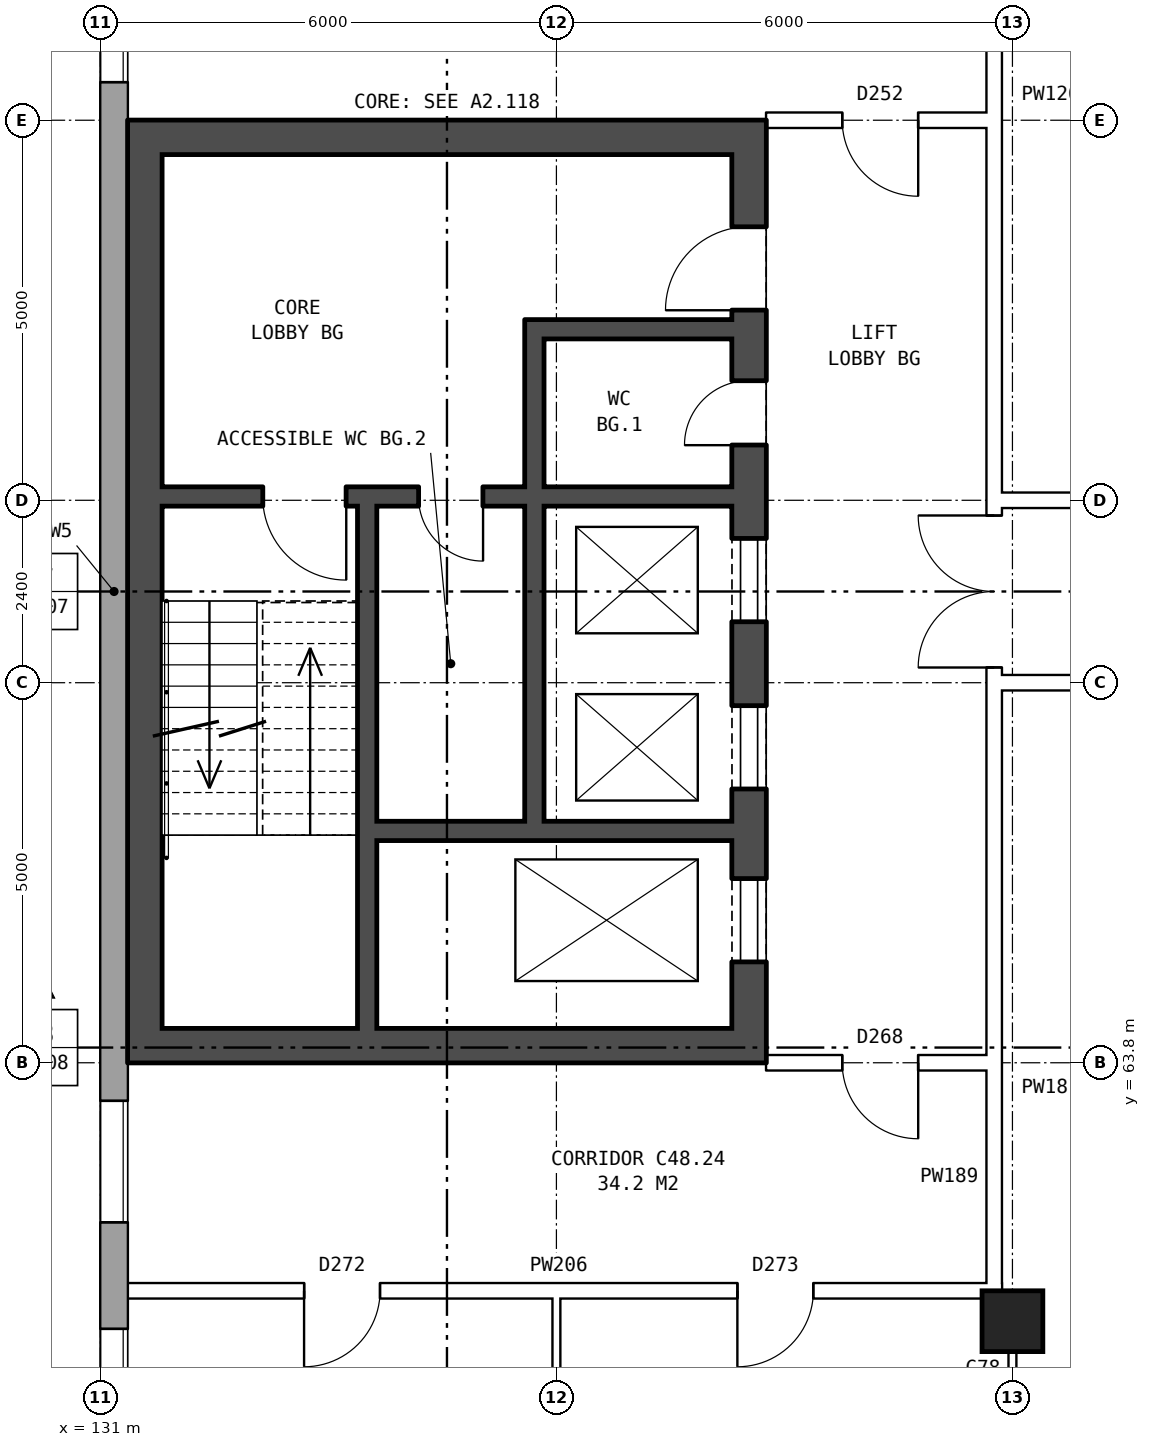
"""IFC4 building model, lengths in metres.
Left out: names, types, materials, properties, quantities, classifications, styles, units other than length and angle.
Written with IfcOpenShell. Run it as: python <this file> out.ifc"""

import sys

from ifc_helpers import new_model, si_unit, direction, frame, frame_2d, origin, origin_2d, place, context, subcontext, project, spatial, rectangle, extrude, element, fill, save


model = new_model("IFC4")
c1 = context("Model", 3, precision=1e-05, world=origin(), true_north=direction((0.0, 1.0)))
c2 = subcontext(c1, "Body", "Model", "MODEL_VIEW")
j1 = project(units=[si_unit("LENGTHUNIT", "METRE"), si_unit("PLANEANGLEUNIT", "RADIAN")], contexts=[c1])
p1 = place(None, origin())
s1 = spatial("IfcSite", under=j1, at=p1, CompositionType="ELEMENT")
p2 = place(p1, origin())
s2 = spatial("IfcBuilding", under=s1, at=p2, CompositionType="ELEMENT")
p3 = place(p2, frame((0.0, 0.0, 171.6)))
s3 = spatial("IfcBuildingStorey", under=s2, at=p3, CompositionType="ELEMENT", Elevation=171.6)
p4 = place(p3, frame((143.0, 60.4, 0.0), z_axis=(0.0, 0.0, 1.0), x_axis=(1.0, 0.0, 0.0)))
e1 = element("IfcColumn", 1, at=p4, inside=s3, PredefinedType="COLUMN", context=c2, shape_type="SweptSolid", body=[
    extrude(rectangle(XDim=0.8, YDim=0.8, at=origin_2d()), origin(), (0.0, 0.0, 1.0), 3.6),
])
p5 = place(p3, frame((131.18, 82.925, 0.0), z_axis=(0.0, 0.0, 1.0), x_axis=(0.0, -1.0, 0.0)))
e2 = element("IfcWall", 2, at=p5, inside=s3, PredefinedType="STANDARD", context=c2, shape_type="SweptSolid", body=[
    extrude(rectangle(XDim=25.851, YDim=0.36, at=frame_2d((12.925, 0.0))), origin(), (0.0, 0.0, 1.0), 3.6),
])
p6 = place(p5, frame((1.625, 0.0, 0.8)))
e3 = element("IfcOpeningElement", 3, at=p6, cuts=e2, PredefinedType="OPENING", context=c2, shape_type="SweptSolid", body=[
    extrude(rectangle(XDim=1.6, YDim=1.8, at=frame_2d((0.8, 0.9))), frame((0.0, 0.19, 0.0), z_axis=(0.0, -1.0, 0.0), x_axis=(1.0, 0.0, 0.0)), (0.0, 0.0, 1.0), 0.38),
])
p7 = place(p5, frame((4.625, 0.0, 0.8)))
e4 = element("IfcOpeningElement", 4, at=p7, cuts=e2, PredefinedType="OPENING", context=c2, shape_type="SweptSolid", body=[
    extrude(rectangle(XDim=1.6, YDim=1.8, at=frame_2d((0.8, 0.9))), frame((0.0, 0.19, 0.0), z_axis=(0.0, -1.0, 0.0), x_axis=(1.0, 0.0, 0.0)), (0.0, 0.0, 1.0), 0.38),
])
p8 = place(p5, frame((19.625, 0.0, 0.8)))
e5 = element("IfcOpeningElement", 5, at=p8, cuts=e2, PredefinedType="OPENING", context=c2, shape_type="SweptSolid", body=[
    extrude(rectangle(XDim=1.6, YDim=1.8, at=frame_2d((0.8, 0.9))), frame((0.0, 0.19, 0.0), z_axis=(0.0, -1.0, 0.0), x_axis=(1.0, 0.0, 0.0)), (0.0, 0.0, 1.0), 0.38),
])
p9 = place(p5, frame((22.625, 0.0, 0.8)))
e6 = element("IfcOpeningElement", 6, at=p9, cuts=e2, PredefinedType="OPENING", context=c2, shape_type="SweptSolid", body=[
    extrude(rectangle(XDim=1.6, YDim=1.8, at=frame_2d((0.8, 0.9))), frame((0.0, 0.19, 0.0), z_axis=(0.0, -1.0, 0.0), x_axis=(1.0, 0.0, 0.0)), (0.0, 0.0, 1.0), 0.38),
])
p10 = place(p3, frame((139.535, 63.8, 0.0), z_axis=(0.0, 0.0, 1.0), x_axis=(0.0, 1.0, 0.0)))
e7 = element("IfcWall", 7, at=p10, inside=s3, PredefinedType="SHEAR", context=c2, shape_type="SweptSolid", body=[
    extrude(rectangle(XDim=12.4, YDim=0.45, at=frame_2d((6.2, 0.0))), origin(), (0.0, 0.0, 1.0), 3.6),
])
p11 = place(p10, frame((1.325, 0.0, 0.0)))
e8 = element("IfcOpeningElement", 8, at=p11, cuts=e7, PredefinedType="OPENING", context=c2, shape_type="SweptSolid", body=[
    extrude(rectangle(XDim=1.1, YDim=2.1, at=frame_2d((0.55, 1.05))), frame((0.0, 0.235, 0.0), z_axis=(0.0, -1.0, 0.0), x_axis=(1.0, 0.0, 0.0)), (0.0, 0.0, 1.0), 0.47),
])
p12 = place(p10, frame((3.6, 0.0, 0.0)))
e9 = element("IfcOpeningElement", 9, at=p12, cuts=e7, PredefinedType="OPENING", context=c2, shape_type="SweptSolid", body=[
    extrude(rectangle(XDim=1.1, YDim=2.1, at=frame_2d((0.55, 1.05))), frame((0.0, 0.235, 0.0), z_axis=(0.0, -1.0, 0.0), x_axis=(1.0, 0.0, 0.0)), (0.0, 0.0, 1.0), 0.47),
])
p13 = place(p10, frame((5.8, 0.0, 0.0)))
e10 = element("IfcOpeningElement", 10, at=p13, cuts=e7, PredefinedType="OPENING", context=c2, shape_type="SweptSolid", body=[
    extrude(rectangle(XDim=1.1, YDim=2.1, at=frame_2d((0.55, 1.05))), frame((0.0, 0.235, 0.0), z_axis=(0.0, -1.0, 0.0), x_axis=(1.0, 0.0, 0.0)), (0.0, 0.0, 1.0), 0.47),
])
p14 = place(p10, frame((9.9, 0.0, 0.0)))
e11 = element("IfcOpeningElement", 11, at=p14, cuts=e7, PredefinedType="OPENING", context=c2, shape_type="SweptSolid", body=[
    extrude(rectangle(XDim=1.1, YDim=2.1, at=frame_2d((0.55, 1.05))), frame((0.0, 0.235, 0.0), z_axis=(0.0, -1.0, 0.0), x_axis=(1.0, 0.0, 0.0)), (0.0, 0.0, 1.0), 0.47),
])
p15 = place(p10, frame((8.125, 0.0, 0.0)))
e12 = element("IfcOpeningElement", 12, at=p15, cuts=e7, PredefinedType="OPENING", context=c2, shape_type="SweptSolid", body=[
    extrude(rectangle(XDim=0.85, YDim=2.1, at=frame_2d((0.425, 1.05))), frame((0.0, 0.235, 0.0), z_axis=(0.0, -1.0, 0.0), x_axis=(1.0, 0.0, 0.0)), (0.0, 0.0, 1.0), 0.47),
])
p16 = place(p3, frame((131.585, 63.8, 0.0), z_axis=(0.0, 0.0, 1.0), x_axis=(0.0, 1.0, 0.0)))
e13 = element("IfcWall", 13, at=p16, inside=s3, PredefinedType="SHEAR", context=c2, shape_type="SweptSolid", body=[
    extrude(rectangle(XDim=12.4, YDim=0.45, at=frame_2d((6.2, 0.0))), origin(), (0.0, 0.0, 1.0), 3.6),
])
for number, where, z_axis, x_axis in (
    (14, (139.31, 64.025, 0.0), (0.0, 0.0, 1.0), (-1.0, 0.0, 0.0)),
    (15, (139.31, 75.975, 0.0), (0.0, 0.0, 1.0), (-1.0, 0.0, 0.0)),
):
    element("IfcWall", number, at=place(p3, frame(where, z_axis=z_axis, x_axis=x_axis)), inside=s3, PredefinedType="SHEAR", context=c2, shape_type="SweptSolid", body=[
        extrude(rectangle(XDim=7.5, YDim=0.45, at=frame_2d((3.75, 0.0))), origin(), (0.0, 0.0, 1.0), 3.6),
    ])
p17 = place(p3, frame((139.31, 66.85, 0.0), z_axis=(0.0, 0.0, 1.0), x_axis=(-1.0, 0.0, 0.0)))
e16 = element("IfcWall", 16, at=p17, inside=s3, PredefinedType="SHEAR", context=c2, shape_type="SweptSolid", body=[
    extrude(rectangle(XDim=4.675, YDim=0.25, at=frame_2d((2.337, 0.0))), origin(), (0.0, 0.0, 1.0), 3.6),
])
p18 = place(p3, frame((139.31, 71.25, 0.0), z_axis=(0.0, 0.0, 1.0), x_axis=(-1.0, 0.0, 0.0)))
e17 = element("IfcWall", 17, at=p18, inside=s3, PredefinedType="SHEAR", context=c2, shape_type="SweptSolid", body=[
    extrude(rectangle(XDim=7.5, YDim=0.25, at=frame_2d((3.75, 0.0))), origin(), (0.0, 0.0, 1.0), 3.6),
])
p19 = place(p18, frame((5.075, 0.0, 0.0)))
e18 = element("IfcOpeningElement", 18, at=p19, cuts=e17, PredefinedType="OPENING", context=c2, shape_type="SweptSolid", body=[
    extrude(rectangle(XDim=1.1, YDim=2.1, at=frame_2d((0.55, 1.05))), frame((0.0, 0.135, 0.0), z_axis=(0.0, -1.0, 0.0), x_axis=(1.0, 0.0, 0.0)), (0.0, 0.0, 1.0), 0.27),
])
p20 = place(p18, frame((3.275, 0.0, 0.0)))
e19 = element("IfcOpeningElement", 19, at=p20, cuts=e17, PredefinedType="OPENING", context=c2, shape_type="SweptSolid", body=[
    extrude(rectangle(XDim=0.85, YDim=2.1, at=frame_2d((0.425, 1.05))), frame((0.0, 0.135, 0.0), z_axis=(0.0, -1.0, 0.0), x_axis=(1.0, 0.0, 0.0)), (0.0, 0.0, 1.0), 0.27),
])
p21 = place(p3, frame((139.31, 73.45, 0.0), z_axis=(0.0, 0.0, 1.0), x_axis=(-1.0, 0.0, 0.0)))
e20 = element("IfcWall", 20, at=p21, inside=s3, PredefinedType="SHEAR", context=c2, shape_type="SweptSolid", body=[
    extrude(rectangle(XDim=2.475, YDim=0.25, at=frame_2d((1.238, 0.0))), origin(), (0.0, 0.0, 1.0), 3.6),
])
p22 = place(p3, frame((136.71, 66.975, 0.0), z_axis=(0.0, 0.0, 1.0), x_axis=(0.0, 1.0, 0.0)))
e21 = element("IfcWall", 21, at=p22, inside=s3, PredefinedType="SHEAR", context=c2, shape_type="SweptSolid", body=[
    extrude(rectangle(XDim=4.15, YDim=0.25, at=frame_2d((2.075, 0.0))), origin(), (0.0, 0.0, 1.0), 3.6),
])
p23 = place(p3, frame((136.71, 71.375, 0.0), z_axis=(0.0, 0.0, 1.0), x_axis=(0.0, 1.0, 0.0)))
e22 = element("IfcWall", 22, at=p23, inside=s3, PredefinedType="SHEAR", context=c2, shape_type="SweptSolid", body=[
    extrude(rectangle(XDim=2.2, YDim=0.25, at=frame_2d((1.1, 0.0))), origin(), (0.0, 0.0, 1.0), 3.6),
])
p24 = place(p3, frame((134.51, 64.25, 0.0), z_axis=(0.0, 0.0, 1.0), x_axis=(0.0, 1.0, 0.0)))
e23 = element("IfcWall", 23, at=p24, inside=s3, PredefinedType="SHEAR", context=c2, shape_type="SweptSolid", body=[
    extrude(rectangle(XDim=6.875, YDim=0.25, at=frame_2d((3.438, 0.0))), origin(), (0.0, 0.0, 1.0), 3.6),
])
p25 = place(p3, frame((142.76, 63.9, 0.0), z_axis=(0.0, 0.0, 1.0), x_axis=(0.0, 1.0, 0.0)))
e24 = element("IfcWall", 24, at=p25, inside=s3, PredefinedType="PARTITIONING", context=c2, shape_type="SweptSolid", body=[
    extrude(rectangle(XDim=12.2, YDim=0.2, at=frame_2d((6.1, 0.0))), origin(), (0.0, 0.0, 1.0), 3.6),
])
p26 = place(p25, frame((5.1, 0.0, 0.0)))
e25 = element("IfcOpeningElement", 25, at=p26, cuts=e24, PredefinedType="OPENING", context=c2, shape_type="SweptSolid", body=[
    extrude(rectangle(XDim=2.0, YDim=2.1, at=frame_2d((1.0, 1.05))), frame((0.0, 0.11, 0.0), z_axis=(0.0, -1.0, 0.0), x_axis=(1.0, 0.0, 0.0)), (0.0, 0.0, 1.0), 0.22),
])
p27 = place(p3, frame((131.24, 60.8, 0.0), z_axis=(0.0, 0.0, 1.0), x_axis=(1.0, 0.0, 0.0)))
e26 = element("IfcWall", 26, at=p27, inside=s3, PredefinedType="PARTITIONING", context=c2, shape_type="SweptSolid", body=[
    extrude(rectangle(XDim=11.622, YDim=0.2, at=frame_2d((5.811, 0.0))), origin(), (0.0, 0.0, 1.0), 3.6),
])
p28 = place(p27, frame((2.44, 0.0, 0.0)))
e27 = element("IfcOpeningElement", 27, at=p28, cuts=e26, PredefinedType="OPENING", context=c2, shape_type="SweptSolid", body=[
    extrude(rectangle(XDim=1.0, YDim=2.1, at=frame_2d((0.5, 1.05))), frame((0.0, 0.11, 0.0), z_axis=(0.0, -1.0, 0.0), x_axis=(1.0, 0.0, 0.0)), (0.0, 0.0, 1.0), 0.22),
])
p29 = place(p27, frame((8.141, 0.0, 0.0)))
e28 = element("IfcOpeningElement", 28, at=p29, cuts=e26, PredefinedType="OPENING", context=c2, shape_type="SweptSolid", body=[
    extrude(rectangle(XDim=1.0, YDim=2.1, at=frame_2d((0.5, 1.05))), frame((0.0, 0.11, 0.0), z_axis=(0.0, -1.0, 0.0), x_axis=(1.0, 0.0, 0.0)), (0.0, 0.0, 1.0), 0.22),
])
p30 = place(p3, frame((139.76, 63.8, 0.0), z_axis=(0.0, 0.0, 1.0), x_axis=(1.0, 0.0, 0.0)))
e29 = element("IfcWall", 29, at=p30, inside=s3, PredefinedType="PARTITIONING", context=c2, shape_type="SweptSolid", body=[
    extrude(rectangle(XDim=3.1, YDim=0.2, at=frame_2d((1.55, 0.0))), origin(), (0.0, 0.0, 1.0), 3.6),
])
p31 = place(p30, frame((1.0, 0.0, 0.0)))
e30 = element("IfcOpeningElement", 30, at=p31, cuts=e29, PredefinedType="OPENING", context=c2, shape_type="SweptSolid", body=[
    extrude(rectangle(XDim=1.0, YDim=2.1, at=frame_2d((0.5, 1.05))), frame((0.0, 0.11, 0.0), z_axis=(0.0, -1.0, 0.0), x_axis=(1.0, 0.0, 0.0)), (0.0, 0.0, 1.0), 0.22),
])
p32 = place(p3, frame((142.76, 68.8, 0.0), z_axis=(0.0, 0.0, 1.0), x_axis=(1.0, 0.0, 0.0)))
e31 = element("IfcWall", 31, at=p32, inside=s3, PredefinedType="PARTITIONING", context=c2, shape_type="SweptSolid", body=[
    extrude(rectangle(XDim=14.48, YDim=0.2, at=frame_2d((7.24, 0.0))), origin(), (0.0, 0.0, 1.0), 3.6),
])
p33 = place(p32, frame((3.02, 0.0, 0.0)))
e32 = element("IfcOpeningElement", 32, at=p33, cuts=e31, PredefinedType="OPENING", context=c2, shape_type="SweptSolid", body=[
    extrude(rectangle(XDim=1.2, YDim=2.1, at=frame_2d((0.6, 1.05))), frame((0.0, 0.11, 0.0), z_axis=(0.0, -1.0, 0.0), x_axis=(1.0, 0.0, 0.0)), (0.0, 0.0, 1.0), 0.22),
])
p34 = place(p3, frame((142.76, 71.2, 0.0), z_axis=(0.0, 0.0, 1.0), x_axis=(1.0, 0.0, 0.0)))
e33 = element("IfcWall", 33, at=p34, inside=s3, PredefinedType="PARTITIONING", context=c2, shape_type="SweptSolid", body=[
    extrude(rectangle(XDim=14.48, YDim=0.2, at=frame_2d((7.24, 0.0))), origin(), (0.0, 0.0, 1.0), 3.6),
])
p35 = place(p3, frame((139.76, 76.2, 0.0), z_axis=(0.0, 0.0, 1.0), x_axis=(1.0, 0.0, 0.0)))
e34 = element("IfcWall", 34, at=p35, inside=s3, PredefinedType="PARTITIONING", context=c2, shape_type="SweptSolid", body=[
    extrude(rectangle(XDim=3.1, YDim=0.2, at=frame_2d((1.55, 0.0))), origin(), (0.0, 0.0, 1.0), 3.6),
])
p36 = place(p35, frame((1.0, 0.0, 0.0)))
e35 = element("IfcOpeningElement", 35, at=p36, cuts=e34, PredefinedType="OPENING", context=c2, shape_type="SweptSolid", body=[
    extrude(rectangle(XDim=1.0, YDim=2.1, at=frame_2d((0.5, 1.05))), frame((0.0, 0.11, 0.0), z_axis=(0.0, -1.0, 0.0), x_axis=(1.0, 0.0, 0.0)), (0.0, 0.0, 1.0), 0.22),
])
p37 = place(p3, frame((137.0, 54.24, 0.0), z_axis=(0.0, 0.0, 1.0), x_axis=(0.0, 1.0, 0.0)))
e36 = element("IfcWall", 36, at=p37, inside=s3, PredefinedType="PARTITIONING", context=c2, shape_type="SweptSolid", body=[
    extrude(rectangle(XDim=6.66, YDim=0.1, at=frame_2d((3.33, 0.0))), origin(), (0.0, 0.0, 1.0), 3.6),
])
p38 = place(p3, frame((142.76, 60.7, 0.0), z_axis=(0.0, 0.0, 1.0), x_axis=(0.0, 1.0, 0.0)))
e37 = element("IfcWall", 37, at=p38, inside=s3, PredefinedType="PARTITIONING", context=c2, shape_type="SweptSolid", body=[
    extrude(rectangle(XDim=3.2, YDim=0.2, at=frame_2d((1.6, 0.0))), origin(), (0.0, 0.0, 1.0), 3.6),
])
p39 = place(p3, frame((142.76, 76.1, 0.0), z_axis=(0.0, 0.0, 1.0), x_axis=(0.0, 1.0, 0.0)))
e38 = element("IfcWall", 38, at=p39, inside=s3, PredefinedType="PARTITIONING", context=c2, shape_type="SweptSolid", body=[
    extrude(rectangle(XDim=3.2, YDim=0.2, at=frame_2d((1.6, 0.0))), origin(), (0.0, 0.0, 1.0), 3.6),
])
p40 = place(p39, frame((1.1, 0.0, 0.0)))
e39 = element("IfcOpeningElement", 39, at=p40, cuts=e38, PredefinedType="OPENING", context=c2, shape_type="SweptSolid", body=[
    extrude(rectangle(XDim=1.0, YDim=2.1, at=frame_2d((0.5, 1.05))), frame((0.0, 0.11, 0.0), z_axis=(0.0, -1.0, 0.0), x_axis=(1.0, 0.0, 0.0)), (0.0, 0.0, 1.0), 0.22),
])
p41 = place(p3, frame((143.0, 54.24, 0.0), z_axis=(0.0, 0.0, 1.0), x_axis=(0.0, 1.0, 0.0)))
e40 = element("IfcWall", 40, at=p41, inside=s3, PredefinedType="PARTITIONING", context=c2, shape_type="SweptSolid", body=[
    extrude(rectangle(XDim=6.56, YDim=0.1, at=frame_2d((3.28, 0.0))), origin(), (0.0, 0.0, 1.0), 3.6),
])
p42 = place(p7, origin())
e41 = element("IfcWindow", 41, at=p42, inside=s3, PartitioningType="SINGLE_PANEL", PredefinedType="WINDOW", context=c2, shape_type="SweptSolid", body=[
    extrude(rectangle(XDim=1.6, YDim=1.8, at=frame_2d((0.8, 0.9))), frame((0.0, 0.15, 0.0), z_axis=(0.0, -1.0, 0.0), x_axis=(1.0, 0.0, 0.0)), (0.0, 0.0, 1.0), 0.06),
])
fill(e4, e41)
p43 = place(p8, origin())
e42 = element("IfcWindow", 42, at=p43, inside=s3, PartitioningType="SINGLE_PANEL", PredefinedType="WINDOW", context=c2, shape_type="SweptSolid", body=[
    extrude(rectangle(XDim=1.6, YDim=1.8, at=frame_2d((0.8, 0.9))), frame((0.0, 0.15, 0.0), z_axis=(0.0, -1.0, 0.0), x_axis=(1.0, 0.0, 0.0)), (0.0, 0.0, 1.0), 0.06),
])
fill(e5, e42)
p44 = place(p9, origin())
e43 = element("IfcWindow", 43, at=p44, inside=s3, PartitioningType="SINGLE_PANEL", PredefinedType="WINDOW", context=c2, shape_type="SweptSolid", body=[
    extrude(rectangle(XDim=1.6, YDim=1.8, at=frame_2d((0.8, 0.9))), frame((0.0, 0.15, 0.0), z_axis=(0.0, -1.0, 0.0), x_axis=(1.0, 0.0, 0.0)), (0.0, 0.0, 1.0), 0.06),
])
fill(e6, e43)
p45 = place(p11, origin())
e44 = element("IfcDoor", 44, at=p45, inside=s3, OperationType="DOUBLE_DOOR_SLIDING", PredefinedType="DOOR", context=c2, shape_type="SweptSolid", body=[
    extrude(rectangle(XDim=1.1, YDim=2.1, at=frame_2d((0.55, 1.05))), frame((0.0, 0.21, 0.0), z_axis=(0.0, -1.0, 0.0), x_axis=(1.0, 0.0, 0.0)), (0.0, 0.0, 1.0), 0.05),
])
fill(e8, e44)
p46 = place(p12, origin())
e45 = element("IfcDoor", 45, at=p46, inside=s3, OperationType="DOUBLE_DOOR_SLIDING", PredefinedType="DOOR", context=c2, shape_type="SweptSolid", body=[
    extrude(rectangle(XDim=1.1, YDim=2.1, at=frame_2d((0.55, 1.05))), frame((0.0, 0.21, 0.0), z_axis=(0.0, -1.0, 0.0), x_axis=(1.0, 0.0, 0.0)), (0.0, 0.0, 1.0), 0.05),
])
fill(e9, e45)
p47 = place(p13, origin())
e46 = element("IfcDoor", 46, at=p47, inside=s3, OperationType="DOUBLE_DOOR_SLIDING", PredefinedType="DOOR", context=c2, shape_type="SweptSolid", body=[
    extrude(rectangle(XDim=1.1, YDim=2.1, at=frame_2d((0.55, 1.05))), frame((0.0, 0.21, 0.0), z_axis=(0.0, -1.0, 0.0), x_axis=(1.0, 0.0, 0.0)), (0.0, 0.0, 1.0), 0.05),
])
fill(e10, e46)
p48 = place(p14, origin())
e47 = element("IfcDoor", 47, at=p48, inside=s3, OperationType="SINGLE_SWING_LEFT", PredefinedType="DOOR", context=c2, shape_type="SweptSolid", body=[
    extrude(rectangle(XDim=1.1, YDim=2.1, at=frame_2d((0.55, 1.05))), frame((0.0, 0.21, 0.0), z_axis=(0.0, -1.0, 0.0), x_axis=(1.0, 0.0, 0.0)), (0.0, 0.0, 1.0), 0.05),
])
fill(e11, e47)
p49 = place(p19, origin())
e48 = element("IfcDoor", 48, at=p49, inside=s3, OperationType="SINGLE_SWING_LEFT", PredefinedType="DOOR", context=c2, shape_type="SweptSolid", body=[
    extrude(rectangle(XDim=1.1, YDim=2.1, at=frame_2d((0.55, 1.05))), frame((0.0, 0.025, 0.0), z_axis=(0.0, -1.0, 0.0), x_axis=(1.0, 0.0, 0.0)), (0.0, 0.0, 1.0), 0.05),
])
fill(e18, e48)
p50 = place(p15, origin())
e49 = element("IfcDoor", 49, at=p50, inside=s3, OperationType="SINGLE_SWING_LEFT", PredefinedType="DOOR", context=c2, shape_type="SweptSolid", body=[
    extrude(rectangle(XDim=0.85, YDim=2.1, at=frame_2d((0.425, 1.05))), frame((0.0, 0.21, 0.0), z_axis=(0.0, -1.0, 0.0), x_axis=(1.0, 0.0, 0.0)), (0.0, 0.0, 1.0), 0.05),
])
fill(e12, e49)
p51 = place(p20, origin())
e50 = element("IfcDoor", 50, at=p51, inside=s3, OperationType="SINGLE_SWING_LEFT", PredefinedType="DOOR", context=c2, shape_type="SweptSolid", body=[
    extrude(rectangle(XDim=0.85, YDim=2.1, at=frame_2d((0.425, 1.05))), frame((0.0, 0.025, 0.0), z_axis=(0.0, -1.0, 0.0), x_axis=(1.0, 0.0, 0.0)), (0.0, 0.0, 1.0), 0.05),
])
fill(e19, e50)
p52 = place(p26, origin())
e51 = element("IfcDoor", 51, at=p52, inside=s3, OperationType="DOUBLE_DOOR_SINGLE_SWING", PredefinedType="DOOR", context=c2, shape_type="SweptSolid", body=[
    extrude(rectangle(XDim=2.0, YDim=2.1, at=frame_2d((1.0, 1.05))), frame((0.0, 0.025, 0.0), z_axis=(0.0, -1.0, 0.0), x_axis=(1.0, 0.0, 0.0)), (0.0, 0.0, 1.0), 0.05),
])
fill(e25, e51)
p53 = place(p28, frame((1.0, 0.0, 0.0), z_axis=(0.0, 0.0, 1.0), x_axis=(-1.0, 0.0, 0.0)))
e52 = element("IfcDoor", 52, at=p53, inside=s3, OperationType="SINGLE_SWING_RIGHT", PredefinedType="DOOR", context=c2, shape_type="SweptSolid", body=[
    extrude(rectangle(XDim=1.0, YDim=2.1, at=frame_2d((0.5, 1.05))), frame((0.0, 0.025, 0.0), z_axis=(0.0, -1.0, 0.0), x_axis=(1.0, 0.0, 0.0)), (0.0, 0.0, 1.0), 0.05),
])
fill(e27, e52)
p54 = place(p29, frame((1.0, 0.0, 0.0), z_axis=(0.0, 0.0, 1.0), x_axis=(-1.0, 0.0, 0.0)))
e53 = element("IfcDoor", 53, at=p54, inside=s3, OperationType="SINGLE_SWING_RIGHT", PredefinedType="DOOR", context=c2, shape_type="SweptSolid", body=[
    extrude(rectangle(XDim=1.0, YDim=2.1, at=frame_2d((0.5, 1.05))), frame((0.0, 0.025, 0.0), z_axis=(0.0, -1.0, 0.0), x_axis=(1.0, 0.0, 0.0)), (0.0, 0.0, 1.0), 0.05),
])
fill(e28, e53)
p55 = place(p31, frame((1.0, 0.0, 0.0), z_axis=(0.0, 0.0, 1.0), x_axis=(-1.0, 0.0, 0.0)))
e54 = element("IfcDoor", 54, at=p55, inside=s3, OperationType="SINGLE_SWING_LEFT", PredefinedType="DOOR", context=c2, shape_type="SweptSolid", body=[
    extrude(rectangle(XDim=1.0, YDim=2.1, at=frame_2d((0.5, 1.05))), frame((0.0, 0.025, 0.0), z_axis=(0.0, -1.0, 0.0), x_axis=(1.0, 0.0, 0.0)), (0.0, 0.0, 1.0), 0.05),
])
fill(e30, e54)
p56 = place(p36, frame((1.0, 0.0, 0.0), z_axis=(0.0, 0.0, 1.0), x_axis=(-1.0, 0.0, 0.0)))
e55 = element("IfcDoor", 55, at=p56, inside=s3, OperationType="SINGLE_SWING_LEFT", PredefinedType="DOOR", context=c2, shape_type="SweptSolid", body=[
    extrude(rectangle(XDim=1.0, YDim=2.1, at=frame_2d((0.5, 1.05))), frame((0.0, 0.025, 0.0), z_axis=(0.0, -1.0, 0.0), x_axis=(1.0, 0.0, 0.0)), (0.0, 0.0, 1.0), 0.05),
])
fill(e35, e55)
save(model, sys.argv[1])
